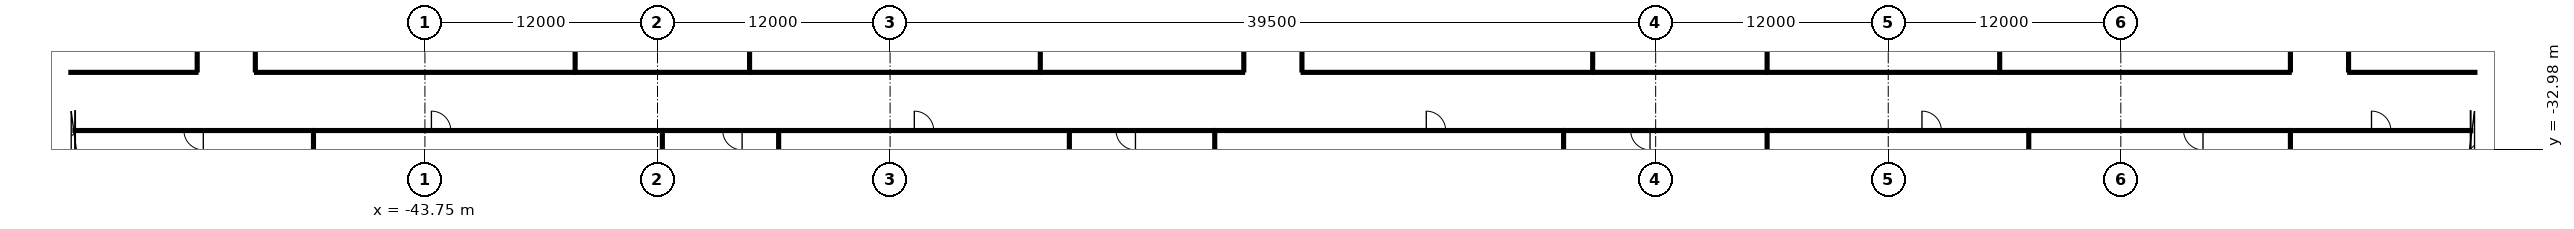
"""IFC4 building model, lengths in metres.
Left out: names, types, materials, properties, quantities, classifications, styles, units other than length and angle.
Written with IfcOpenShell. Run it as: python <this file> out.ifc"""

import sys

from ifc_helpers import new_model, si_unit, direction, frame, frame_2d, origin, origin_2d, place, context, subcontext, project, spatial, rectangle, circle, extrude, element, fill, save


model = new_model("IFC4")
c1 = context("Model", 3, precision=1e-05, world=origin(), true_north=direction((0.0, 1.0)))
c2 = subcontext(c1, "Body", "Model", "MODEL_VIEW")
j1 = project(units=[si_unit("LENGTHUNIT", "METRE"), si_unit("PLANEANGLEUNIT", "RADIAN")], contexts=[c1])
p1 = place(None, origin())
s1 = spatial("IfcSite", under=j1, at=p1, CompositionType="ELEMENT")
p2 = place(p1, origin())
s2 = spatial("IfcBuilding", under=s1, at=p2, CompositionType="ELEMENT")
p3 = place(p2, frame((0.0, 0.0, 7.0)))
s3 = spatial("IfcBuildingStorey", under=s2, at=p3, CompositionType="ELEMENT", Elevation=7.0)
for number, where, z_axis, x_axis in (
    (1, (4.2, -31.0, 0.0), (0.0, 0.0, 1.0), (1.0, 0.0, 0.0)),
    (2, (12.6, -31.0, 0.0), (0.0, 0.0, 1.0), (1.0, 0.0, 0.0)),
    (3, (21.0, -31.0, 0.0), (0.0, 0.0, 1.0), (1.0, 0.0, 0.0)),
    (4, (29.4, -31.0, 0.0), (0.0, 0.0, 1.0), (1.0, 0.0, 0.0)),
    (5, (37.8, -31.0, 0.0), (0.0, 0.0, 1.0), (1.0, 0.0, 0.0)),
):
    element("IfcColumn", number, at=place(p3, frame(where, z_axis=z_axis, x_axis=x_axis)), inside=s3, PredefinedType="COLUMN", context=c2, shape_type="SweptSolid", body=[
        extrude(circle(Radius=0.6, at=origin_2d()), origin(), (0.0, 0.0, 1.0), 5.0),
    ])
p4 = place(p3, frame((-61.868, -32.0, 0.0), z_axis=(0.0, 0.0, 1.0), x_axis=(1.0, 0.0, 0.0)))
e6 = element("IfcWall", 6, at=p4, inside=s3, PredefinedType="PARTITIONING", context=c2, shape_type="SweptSolid", body=[
    extrude(rectangle(XDim=12.368, YDim=0.125, at=frame_2d((6.184, 0.0))), origin(), (0.0, 0.0, 1.0), 3.762),
])
p5 = place(p4, frame((5.684, 0.0, 0.0)))
e7 = element("IfcOpeningElement", 7, at=p5, cuts=e6, PredefinedType="OPENING", context=c2, shape_type="SweptSolid", body=[
    extrude(rectangle(XDim=1.0, YDim=2.1, at=frame_2d((0.5, 1.05))), frame((0.0, 0.073, 0.0), z_axis=(0.0, -1.0, 0.0), x_axis=(1.0, 0.0, 0.0)), (0.0, 0.0, 1.0), 0.145),
])
p6 = place(p3, frame((-49.5, -32.0, 0.0), z_axis=(0.0, 0.0, 1.0), x_axis=(1.0, 0.0, 0.0)))
e8 = element("IfcWall", 8, at=p6, inside=s3, PredefinedType="PARTITIONING", context=c2, shape_type="SweptSolid", body=[
    extrude(rectangle(XDim=18.0, YDim=0.125, at=frame_2d((9.0, 0.0))), origin(), (0.0, 0.0, 1.0), 3.762),
])
p7 = place(p6, frame((6.085, 0.0, 0.0)))
e9 = element("IfcOpeningElement", 9, at=p7, cuts=e8, PredefinedType="OPENING", context=c2, shape_type="SweptSolid", body=[
    extrude(rectangle(XDim=1.0, YDim=2.1, at=frame_2d((0.5, 1.05))), frame((0.0, 0.073, 0.0), z_axis=(0.0, -1.0, 0.0), x_axis=(1.0, 0.0, 0.0)), (0.0, 0.0, 1.0), 0.145),
])
p8 = place(p3, frame((-31.5, -32.0, 0.0), z_axis=(0.0, 0.0, 1.0), x_axis=(1.0, 0.0, 0.0)))
e10 = element("IfcWall", 10, at=p8, inside=s3, PredefinedType="PARTITIONING", context=c2, shape_type="SweptSolid", body=[
    extrude(rectangle(XDim=6.0, YDim=0.125, at=frame_2d((3.0, 0.0))), origin(), (0.0, 0.0, 1.0), 3.762),
])
p9 = place(p8, frame((3.115, 0.0, 0.0)))
e11 = element("IfcOpeningElement", 11, at=p9, cuts=e10, PredefinedType="OPENING", context=c2, shape_type="SweptSolid", body=[
    extrude(rectangle(XDim=1.0, YDim=2.1, at=frame_2d((0.5, 1.05))), frame((0.0, 0.073, 0.0), z_axis=(0.0, -1.0, 0.0), x_axis=(1.0, 0.0, 0.0)), (0.0, 0.0, 1.0), 0.145),
])
p10 = place(p3, frame((-25.5, -32.0, 0.0), z_axis=(0.0, 0.0, 1.0), x_axis=(1.0, 0.0, 0.0)))
e12 = element("IfcWall", 12, at=p10, inside=s3, PredefinedType="PARTITIONING", context=c2, shape_type="SweptSolid", body=[
    extrude(rectangle(XDim=15.0, YDim=0.125, at=frame_2d((7.5, 0.0))), origin(), (0.0, 0.0, 1.0), 3.762),
])
p11 = place(p10, frame((7.0, 0.0, 0.0)))
e13 = element("IfcOpeningElement", 13, at=p11, cuts=e12, PredefinedType="OPENING", context=c2, shape_type="SweptSolid", body=[
    extrude(rectangle(XDim=1.0, YDim=2.1, at=frame_2d((0.5, 1.05))), frame((0.0, 0.073, 0.0), z_axis=(0.0, -1.0, 0.0), x_axis=(1.0, 0.0, 0.0)), (0.0, 0.0, 1.0), 0.145),
])
p12 = place(p3, frame((-10.5, -32.0, 0.0), z_axis=(0.0, 0.0, 1.0), x_axis=(1.0, 0.0, 0.0)))
e14 = element("IfcWall", 14, at=p12, inside=s3, PredefinedType="PARTITIONING", context=c2, shape_type="SweptSolid", body=[
    extrude(rectangle(XDim=7.5, YDim=0.125, at=frame_2d((3.75, 0.0))), origin(), (0.0, 0.0, 1.0), 3.762),
])
p13 = place(p12, frame((2.41, 0.0, 0.0)))
e15 = element("IfcOpeningElement", 15, at=p13, cuts=e14, PredefinedType="OPENING", context=c2, shape_type="SweptSolid", body=[
    extrude(rectangle(XDim=1.0, YDim=2.1, at=frame_2d((0.5, 1.05))), frame((0.0, 0.073, 0.0), z_axis=(0.0, -1.0, 0.0), x_axis=(1.0, 0.0, 0.0)), (0.0, 0.0, 1.0), 0.145),
])
p14 = place(p3, frame((-3.0, -32.0, 0.0), z_axis=(0.0, 0.0, 1.0), x_axis=(1.0, 0.0, 0.0)))
e16 = element("IfcWall", 16, at=p14, inside=s3, PredefinedType="PARTITIONING", context=c2, shape_type="SweptSolid", body=[
    extrude(rectangle(XDim=18.0, YDim=0.125, at=frame_2d((9.0, 0.0))), origin(), (0.0, 0.0, 1.0), 3.762),
])
p15 = place(p14, frame((10.915, 0.0, 0.0)))
e17 = element("IfcOpeningElement", 17, at=p15, cuts=e16, PredefinedType="OPENING", context=c2, shape_type="SweptSolid", body=[
    extrude(rectangle(XDim=1.0, YDim=2.1, at=frame_2d((0.5, 1.05))), frame((0.0, 0.073, 0.0), z_axis=(0.0, -1.0, 0.0), x_axis=(1.0, 0.0, 0.0)), (0.0, 0.0, 1.0), 0.145),
])
p16 = place(p3, frame((15.0, -32.0, 0.0), z_axis=(0.0, 0.0, 1.0), x_axis=(1.0, 0.0, 0.0)))
e18 = element("IfcWall", 18, at=p16, inside=s3, PredefinedType="PARTITIONING", context=c2, shape_type="SweptSolid", body=[
    extrude(rectangle(XDim=10.5, YDim=0.125, at=frame_2d((5.25, 0.0))), origin(), (0.0, 0.0, 1.0), 3.762),
])
p17 = place(p16, frame((3.46, 0.0, 0.0)))
e19 = element("IfcOpeningElement", 19, at=p17, cuts=e18, PredefinedType="OPENING", context=c2, shape_type="SweptSolid", body=[
    extrude(rectangle(XDim=1.0, YDim=2.1, at=frame_2d((0.5, 1.05))), frame((0.0, 0.073, 0.0), z_axis=(0.0, -1.0, 0.0), x_axis=(1.0, 0.0, 0.0)), (0.0, 0.0, 1.0), 0.145),
])
p18 = place(p3, frame((25.5, -32.0, 0.0), z_axis=(0.0, 0.0, 1.0), x_axis=(1.0, 0.0, 0.0)))
e20 = element("IfcWall", 20, at=p18, inside=s3, PredefinedType="PARTITIONING", context=c2, shape_type="SweptSolid", body=[
    extrude(rectangle(XDim=13.5, YDim=0.125, at=frame_2d((6.75, 0.0))), origin(), (0.0, 0.0, 1.0), 3.762),
])
p19 = place(p18, frame((7.99, 0.0, 0.0)))
e21 = element("IfcOpeningElement", 21, at=p19, cuts=e20, PredefinedType="OPENING", context=c2, shape_type="SweptSolid", body=[
    extrude(rectangle(XDim=1.0, YDim=2.1, at=frame_2d((0.5, 1.05))), frame((0.0, 0.073, 0.0), z_axis=(0.0, -1.0, 0.0), x_axis=(1.0, 0.0, 0.0)), (0.0, 0.0, 1.0), 0.145),
])
p20 = place(p3, frame((39.0, -32.0, 0.0), z_axis=(0.0, 0.0, 1.0), x_axis=(1.0, 0.0, 0.0)))
e22 = element("IfcWall", 22, at=p20, inside=s3, PredefinedType="PARTITIONING", context=c2, shape_type="SweptSolid", body=[
    extrude(rectangle(XDim=13.5, YDim=0.125, at=frame_2d((6.75, 0.0))), origin(), (0.0, 0.0, 1.0), 4.7),
])
p21 = place(p20, frame((7.99, 0.0, 0.0)))
e23 = element("IfcOpeningElement", 23, at=p21, cuts=e22, PredefinedType="OPENING", context=c2, shape_type="SweptSolid", body=[
    extrude(rectangle(XDim=1.0, YDim=2.1, at=frame_2d((0.5, 1.05))), frame((0.0, 0.073, 0.0), z_axis=(0.0, -1.0, 0.0), x_axis=(1.0, 0.0, 0.0)), (0.0, 0.0, 1.0), 0.145),
])
p22 = place(p3, frame((52.5, -32.0, 0.0), z_axis=(0.0, 0.0, 1.0), x_axis=(1.0, 0.0, 0.0)))
e24 = element("IfcWall", 24, at=p22, inside=s3, PredefinedType="PARTITIONING", context=c2, shape_type="SweptSolid", body=[
    extrude(rectangle(XDim=9.368, YDim=0.125, at=frame_2d((4.684, 0.0))), origin(), (0.0, 0.0, 1.0), 3.762),
])
p23 = place(p22, frame((4.184, 0.0, 0.0)))
e25 = element("IfcOpeningElement", 25, at=p23, cuts=e24, PredefinedType="OPENING", context=c2, shape_type="SweptSolid", body=[
    extrude(rectangle(XDim=1.0, YDim=2.1, at=frame_2d((0.5, 1.05))), frame((0.0, 0.073, 0.0), z_axis=(0.0, -1.0, 0.0), x_axis=(1.0, 0.0, 0.0)), (0.0, 0.0, 1.0), 0.145),
])
p24 = place(p3, frame((-55.5, -29.0, 0.0), z_axis=(0.0, 0.0, 1.0), x_axis=(-1.0, 0.0, 0.0)))
e26 = element("IfcWall", 26, at=p24, inside=s3, PredefinedType="PARTITIONING", context=c2, shape_type="SweptSolid", body=[
    extrude(rectangle(XDim=6.58, YDim=0.125, at=frame_2d((3.29, 0.0))), origin(), (0.0, 0.0, 1.0), 3.762),
])
p25 = place(p3, frame((-36.0, -29.0, 0.0), z_axis=(0.0, 0.0, 1.0), x_axis=(-1.0, 0.0, 0.0)))
e27 = element("IfcWall", 27, at=p25, inside=s3, PredefinedType="PARTITIONING", context=c2, shape_type="SweptSolid", body=[
    extrude(rectangle(XDim=16.5, YDim=0.125, at=frame_2d((8.25, 0.0))), origin(), (0.0, 0.0, 1.0), 3.762),
])
p26 = place(p3, frame((-27.0, -29.0, 0.0), z_axis=(0.0, 0.0, 1.0), x_axis=(-1.0, 0.0, 0.0)))
e28 = element("IfcWall", 28, at=p26, inside=s3, PredefinedType="PARTITIONING", context=c2, shape_type="SweptSolid", body=[
    extrude(rectangle(XDim=9.0, YDim=0.125, at=frame_2d((4.5, 0.0))), origin(), (0.0, 0.0, 1.0), 3.762),
])
p27 = place(p3, frame((-12.0, -29.0, 0.0), z_axis=(0.0, 0.0, 1.0), x_axis=(-1.0, 0.0, 0.0)))
e29 = element("IfcWall", 29, at=p27, inside=s3, PredefinedType="PARTITIONING", context=c2, shape_type="SweptSolid", body=[
    extrude(rectangle(XDim=15.0, YDim=0.125, at=frame_2d((7.5, 0.0))), origin(), (0.0, 0.0, 1.0), 3.762),
])
p28 = place(p3, frame((-1.5, -29.0, 0.0), z_axis=(0.0, 0.0, 1.0), x_axis=(-1.0, 0.0, 0.0)))
e30 = element("IfcWall", 30, at=p28, inside=s3, PredefinedType="PARTITIONING", context=c2, shape_type="SweptSolid", body=[
    extrude(rectangle(XDim=10.5, YDim=0.125, at=frame_2d((5.25, 0.0))), origin(), (0.0, 0.0, 1.0), 3.762),
])
p29 = place(p3, frame((16.5, -29.0, 0.0), z_axis=(0.0, 0.0, 1.0), x_axis=(-1.0, 0.0, 0.0)))
e31 = element("IfcWall", 31, at=p29, inside=s3, PredefinedType="PARTITIONING", context=c2, shape_type="SweptSolid", body=[
    extrude(rectangle(XDim=15.0, YDim=0.125, at=frame_2d((7.5, 0.0))), origin(), (0.0, 0.0, 1.0), 3.762),
])
p30 = place(p3, frame((25.5, -29.0, 0.0), z_axis=(0.0, 0.0, 1.0), x_axis=(-1.0, 0.0, 0.0)))
e32 = element("IfcWall", 32, at=p30, inside=s3, PredefinedType="PARTITIONING", context=c2, shape_type="SweptSolid", body=[
    extrude(rectangle(XDim=9.0, YDim=0.125, at=frame_2d((4.5, 0.0))), origin(), (0.0, 0.0, 1.0), 3.762),
])
p31 = place(p3, frame((37.5, -29.0, 0.0), z_axis=(0.0, 0.0, 1.0), x_axis=(-1.0, 0.0, 0.0)))
e33 = element("IfcWall", 33, at=p31, inside=s3, PredefinedType="PARTITIONING", context=c2, shape_type="SweptSolid", body=[
    extrude(rectangle(XDim=12.0, YDim=0.125, at=frame_2d((6.0, 0.0))), origin(), (0.0, 0.0, 1.0), 3.762),
])
p32 = place(p3, frame((52.5, -29.0, 0.0), z_axis=(0.0, 0.0, 1.0), x_axis=(-1.0, 0.0, 0.0)))
e34 = element("IfcWall", 34, at=p32, inside=s3, PredefinedType="PARTITIONING", context=c2, shape_type="SweptSolid", body=[
    extrude(rectangle(XDim=15.0, YDim=0.125, at=frame_2d((7.5, 0.0))), origin(), (0.0, 0.0, 1.0), 3.762),
])
p33 = place(p3, frame((62.08, -29.0, 0.0), z_axis=(0.0, 0.0, 1.0), x_axis=(-1.0, 0.0, 0.0)))
e35 = element("IfcWall", 35, at=p33, inside=s3, PredefinedType="PARTITIONING", context=c2, shape_type="SweptSolid", body=[
    extrude(rectangle(XDim=6.58, YDim=0.125, at=frame_2d((3.29, 0.0))), origin(), (0.0, 0.0, 1.0), 3.762),
])
p34 = place(p3, frame((-55.5, -11.062, 0.0), z_axis=(0.0, 0.0, 1.0), x_axis=(0.0, -1.0, 0.0)))
e36 = element("IfcWall", 36, at=p34, inside=s3, PredefinedType="PARTITIONING", context=c2, shape_type="SweptSolid", body=[
    extrude(rectangle(XDim=17.875, YDim=0.125, at=frame_2d((8.938, 0.0))), origin(), (0.0, 0.0, 1.0), 3.48),
])
p35 = place(p34, frame((6.041, 0.0, 0.0)))
e37 = element("IfcOpeningElement", 37, at=p35, cuts=e36, PredefinedType="OPENING", context=c2, shape_type="SweptSolid", body=[
    extrude(rectangle(XDim=1.0, YDim=2.1, at=frame_2d((0.5, 1.05))), frame((0.0, 0.073, 0.0), z_axis=(0.0, -1.0, 0.0), x_axis=(1.0, 0.0, 0.0)), (0.0, 0.0, 1.0), 0.145),
])
p36 = place(p3, frame((-52.5, -28.938, 0.0), z_axis=(0.0, 0.0, 1.0), x_axis=(0.0, 1.0, 0.0)))
e38 = element("IfcWall", 38, at=p36, inside=s3, PredefinedType="PARTITIONING", context=c2, shape_type="SweptSolid", body=[
    extrude(rectangle(XDim=17.875, YDim=0.125, at=frame_2d((8.938, 0.0))), origin(), (0.0, 0.0, 1.0), 3.48),
])
p37 = place(p36, frame((10.834, 0.0, 0.0)))
e39 = element("IfcOpeningElement", 39, at=p37, cuts=e38, PredefinedType="OPENING", context=c2, shape_type="SweptSolid", body=[
    extrude(rectangle(XDim=1.0, YDim=2.1, at=frame_2d((0.5, 1.05))), frame((0.0, 0.073, 0.0), z_axis=(0.0, -1.0, 0.0), x_axis=(1.0, 0.0, 0.0)), (0.0, 0.0, 1.0), 0.145),
])
p38 = place(p3, frame((-1.5, -11.062, 0.0), z_axis=(0.0, 0.0, 1.0), x_axis=(0.0, -1.0, 0.0)))
e40 = element("IfcWall", 40, at=p38, inside=s3, PredefinedType="PARTITIONING", context=c2, shape_type="SweptSolid", body=[
    extrude(rectangle(XDim=17.875, YDim=0.125, at=frame_2d((8.938, 0.0))), origin(), (0.0, 0.0, 1.0), 3.48),
])
p39 = place(p38, frame((10.834, 0.0, 0.0)))
e41 = element("IfcOpeningElement", 41, at=p39, cuts=e40, PredefinedType="OPENING", context=c2, shape_type="SweptSolid", body=[
    extrude(rectangle(XDim=1.0, YDim=2.1, at=frame_2d((0.5, 1.05))), frame((0.0, 0.073, 0.0), z_axis=(0.0, -1.0, 0.0), x_axis=(1.0, 0.0, 0.0)), (0.0, 0.0, 1.0), 0.145),
])
p40 = place(p3, frame((1.5, -28.938, 0.0), z_axis=(0.0, 0.0, 1.0), x_axis=(0.0, 1.0, 0.0)))
e42 = element("IfcWall", 42, at=p40, inside=s3, PredefinedType="PARTITIONING", context=c2, shape_type="SweptSolid", body=[
    extrude(rectangle(XDim=17.875, YDim=0.125, at=frame_2d((8.938, 0.0))), origin(), (0.0, 0.0, 1.0), 3.48),
])
p41 = place(p40, frame((8.438, 0.0, 0.0)))
e43 = element("IfcOpeningElement", 43, at=p41, cuts=e42, PredefinedType="OPENING", context=c2, shape_type="SweptSolid", body=[
    extrude(rectangle(XDim=1.0, YDim=2.1, at=frame_2d((0.5, 1.05))), frame((0.0, 0.073, 0.0), z_axis=(0.0, -1.0, 0.0), x_axis=(1.0, 0.0, 0.0)), (0.0, 0.0, 1.0), 0.145),
])
p42 = place(p3, frame((52.5, -11.062, 0.0), z_axis=(0.0, 0.0, 1.0), x_axis=(0.0, -1.0, 0.0)))
e44 = element("IfcWall", 44, at=p42, inside=s3, PredefinedType="PARTITIONING", context=c2, shape_type="SweptSolid", body=[
    extrude(rectangle(XDim=17.875, YDim=0.125, at=frame_2d((8.938, 0.0))), origin(), (0.0, 0.0, 1.0), 3.48),
])
p43 = place(p42, frame((8.438, 0.0, 0.0)))
e45 = element("IfcOpeningElement", 45, at=p43, cuts=e44, PredefinedType="OPENING", context=c2, shape_type="SweptSolid", body=[
    extrude(rectangle(XDim=1.0, YDim=2.1, at=frame_2d((0.5, 1.05))), frame((0.0, 0.073, 0.0), z_axis=(0.0, -1.0, 0.0), x_axis=(1.0, 0.0, 0.0)), (0.0, 0.0, 1.0), 0.145),
])
p44 = place(p3, frame((55.5, -28.938, 0.0), z_axis=(0.0, 0.0, 1.0), x_axis=(0.0, 1.0, 0.0)))
e46 = element("IfcWall", 46, at=p44, inside=s3, PredefinedType="PARTITIONING", context=c2, shape_type="SweptSolid", body=[
    extrude(rectangle(XDim=17.875, YDim=0.125, at=frame_2d((8.938, 0.0))), origin(), (0.0, 0.0, 1.0), 3.48),
])
p45 = place(p44, frame((6.041, 0.0, 0.0)))
e47 = element("IfcOpeningElement", 47, at=p45, cuts=e46, PredefinedType="OPENING", context=c2, shape_type="SweptSolid", body=[
    extrude(rectangle(XDim=1.0, YDim=2.1, at=frame_2d((0.5, 1.05))), frame((0.0, 0.073, 0.0), z_axis=(0.0, -1.0, 0.0), x_axis=(1.0, 0.0, 0.0)), (0.0, 0.0, 1.0), 0.145),
])
for number, where, z_axis, x_axis in (
    (48, (-49.5, -43.08, 0.0), (0.0, 0.0, 1.0), (0.0, 1.0, 0.0)),
    (49, (-31.5, -43.08, 0.0), (0.0, 0.0, 1.0), (0.0, 1.0, 0.0)),
    (50, (-25.5, -43.08, 0.0), (0.0, 0.0, 1.0), (0.0, 1.0, 0.0)),
    (51, (-10.5, -43.08, 0.0), (0.0, 0.0, 1.0), (0.0, 1.0, 0.0)),
    (52, (-3.0, -43.08, 0.0), (0.0, 0.0, 1.0), (0.0, 1.0, 0.0)),
    (53, (15.0, -43.08, 0.0), (0.0, 0.0, 1.0), (0.0, 1.0, 0.0)),
    (54, (25.5, -43.08, 0.0), (0.0, 0.0, 1.0), (0.0, 1.0, 0.0)),
    (55, (39.0, -43.08, 0.0), (0.0, 0.0, 1.0), (0.0, 1.0, 0.0)),
):
    element("IfcWall", number, at=place(p3, frame(where, z_axis=z_axis, x_axis=x_axis)), inside=s3, PredefinedType="PARTITIONING", context=c2, shape_type="SweptSolid", body=[
        extrude(rectangle(XDim=11.018, YDim=0.125, at=frame_2d((5.509, 0.0))), origin(), (0.0, 0.0, 1.0), 3.48),
    ])
p46 = place(p3, frame((52.5, -42.671, 0.0), z_axis=(0.0, 0.0, 1.0), x_axis=(0.0, 1.0, 0.0)))
e56 = element("IfcWall", 56, at=p46, inside=s3, PredefinedType="PARTITIONING", context=c2, shape_type="SweptSolid", body=[
    extrude(rectangle(XDim=10.608, YDim=0.125, at=frame_2d((5.304, 0.0))), origin(), (0.0, 0.0, 1.0), 3.48),
])
for number, where, z_axis, x_axis in (
    (57, (-36.0, -28.938, 0.0), (0.0, 0.0, 1.0), (0.0, 1.0, 0.0)),
    (58, (-27.0, -28.938, 0.0), (0.0, 0.0, 1.0), (0.0, 1.0, 0.0)),
    (59, (-12.0, -28.938, 0.0), (0.0, 0.0, 1.0), (0.0, 1.0, 0.0)),
):
    element("IfcWall", number, at=place(p3, frame(where, z_axis=z_axis, x_axis=x_axis)), inside=s3, PredefinedType="PARTITIONING", context=c2, shape_type="SweptSolid", body=[
        extrude(rectangle(XDim=17.875, YDim=0.125, at=frame_2d((8.938, 0.0))), origin(), (0.0, 0.0, 1.0), 3.48),
    ])
for number, where, z_axis, x_axis in (
    (60, (16.5, -28.938, 0.0), (0.0, 0.0, 1.0), (0.0, 1.0, 0.0)),
    (61, (25.5, -28.938, 0.0), (0.0, 0.0, 1.0), (0.0, 1.0, 0.0)),
    (62, (37.5, -28.938, 0.0), (0.0, 0.0, 1.0), (0.0, 1.0, 0.0)),
):
    element("IfcWall", number, at=place(p3, frame(where, z_axis=z_axis, x_axis=x_axis)), inside=s3, PredefinedType="PARTITIONING", context=c2, shape_type="SweptSolid", body=[
        extrude(rectangle(XDim=17.875, YDim=0.125, at=frame_2d((8.938, 0.0))), origin(), (0.0, 0.0, 1.0), 3.996),
    ])
p47 = place(p5, origin())
e63 = element("IfcDoor", 63, at=p47, inside=s3, OperationType="SINGLE_SWING_RIGHT", PredefinedType="DOOR", context=c2, shape_type="SweptSolid", body=[
    extrude(rectangle(XDim=1.0, YDim=2.1, at=frame_2d((0.5, 1.05))), frame((0.0, 0.025, 0.0), z_axis=(0.0, -1.0, 0.0), x_axis=(1.0, 0.0, 0.0)), (0.0, 0.0, 1.0), 0.05),
])
fill(e7, e63)
p48 = place(p7, origin())
e64 = element("IfcDoor", 64, at=p48, inside=s3, OperationType="SINGLE_SWING_LEFT", PredefinedType="DOOR", context=c2, shape_type="SweptSolid", body=[
    extrude(rectangle(XDim=1.0, YDim=2.1, at=frame_2d((0.5, 1.05))), frame((0.0, 0.025, 0.0), z_axis=(0.0, -1.0, 0.0), x_axis=(1.0, 0.0, 0.0)), (0.0, 0.0, 1.0), 0.05),
])
fill(e9, e64)
p49 = place(p9, origin())
e65 = element("IfcDoor", 65, at=p49, inside=s3, OperationType="SINGLE_SWING_RIGHT", PredefinedType="DOOR", context=c2, shape_type="SweptSolid", body=[
    extrude(rectangle(XDim=1.0, YDim=2.1, at=frame_2d((0.5, 1.05))), frame((0.0, 0.025, 0.0), z_axis=(0.0, -1.0, 0.0), x_axis=(1.0, 0.0, 0.0)), (0.0, 0.0, 1.0), 0.05),
])
fill(e11, e65)
p50 = place(p11, origin())
e66 = element("IfcDoor", 66, at=p50, inside=s3, OperationType="SINGLE_SWING_LEFT", PredefinedType="DOOR", context=c2, shape_type="SweptSolid", body=[
    extrude(rectangle(XDim=1.0, YDim=2.1, at=frame_2d((0.5, 1.05))), frame((0.0, 0.025, 0.0), z_axis=(0.0, -1.0, 0.0), x_axis=(1.0, 0.0, 0.0)), (0.0, 0.0, 1.0), 0.05),
])
fill(e13, e66)
p51 = place(p13, origin())
e67 = element("IfcDoor", 67, at=p51, inside=s3, OperationType="SINGLE_SWING_RIGHT", PredefinedType="DOOR", context=c2, shape_type="SweptSolid", body=[
    extrude(rectangle(XDim=1.0, YDim=2.1, at=frame_2d((0.5, 1.05))), frame((0.0, 0.025, 0.0), z_axis=(0.0, -1.0, 0.0), x_axis=(1.0, 0.0, 0.0)), (0.0, 0.0, 1.0), 0.05),
])
fill(e15, e67)
p52 = place(p15, origin())
e68 = element("IfcDoor", 68, at=p52, inside=s3, OperationType="SINGLE_SWING_LEFT", PredefinedType="DOOR", context=c2, shape_type="SweptSolid", body=[
    extrude(rectangle(XDim=1.0, YDim=2.1, at=frame_2d((0.5, 1.05))), frame((0.0, 0.025, 0.0), z_axis=(0.0, -1.0, 0.0), x_axis=(1.0, 0.0, 0.0)), (0.0, 0.0, 1.0), 0.05),
])
fill(e17, e68)
p53 = place(p17, origin())
e69 = element("IfcDoor", 69, at=p53, inside=s3, OperationType="SINGLE_SWING_RIGHT", PredefinedType="DOOR", context=c2, shape_type="SweptSolid", body=[
    extrude(rectangle(XDim=1.0, YDim=2.1, at=frame_2d((0.5, 1.05))), frame((0.0, 0.025, 0.0), z_axis=(0.0, -1.0, 0.0), x_axis=(1.0, 0.0, 0.0)), (0.0, 0.0, 1.0), 0.05),
])
fill(e19, e69)
p54 = place(p19, origin())
e70 = element("IfcDoor", 70, at=p54, inside=s3, OperationType="SINGLE_SWING_LEFT", PredefinedType="DOOR", context=c2, shape_type="SweptSolid", body=[
    extrude(rectangle(XDim=1.0, YDim=2.1, at=frame_2d((0.5, 1.05))), frame((0.0, 0.025, 0.0), z_axis=(0.0, -1.0, 0.0), x_axis=(1.0, 0.0, 0.0)), (0.0, 0.0, 1.0), 0.05),
])
fill(e21, e70)
p55 = place(p21, origin())
e71 = element("IfcDoor", 71, at=p55, inside=s3, OperationType="SINGLE_SWING_RIGHT", PredefinedType="DOOR", context=c2, shape_type="SweptSolid", body=[
    extrude(rectangle(XDim=1.0, YDim=2.1, at=frame_2d((0.5, 1.05))), frame((0.0, 0.025, 0.0), z_axis=(0.0, -1.0, 0.0), x_axis=(1.0, 0.0, 0.0)), (0.0, 0.0, 1.0), 0.05),
])
fill(e23, e71)
p56 = place(p23, origin())
e72 = element("IfcDoor", 72, at=p56, inside=s3, OperationType="SINGLE_SWING_LEFT", PredefinedType="DOOR", context=c2, shape_type="SweptSolid", body=[
    extrude(rectangle(XDim=1.0, YDim=2.1, at=frame_2d((0.5, 1.05))), frame((0.0, 0.025, 0.0), z_axis=(0.0, -1.0, 0.0), x_axis=(1.0, 0.0, 0.0)), (0.0, 0.0, 1.0), 0.05),
])
fill(e25, e72)
save(model, sys.argv[1])
